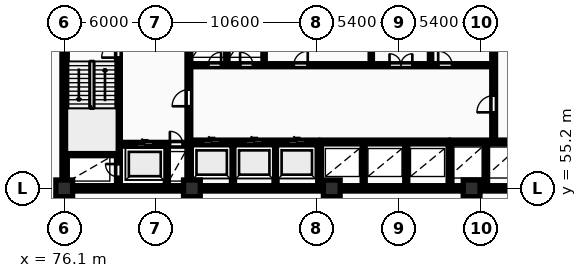
"""IFC4 building model, lengths in metres.
Left out: names, types, materials, properties, quantities, classifications, styles, units other than length and angle.
Written with IfcOpenShell. Run it as: python <this file> out.ifc"""

import sys

from ifc_helpers import new_model, si_unit, direction, frame, frame_2d, origin, origin_2d, place, context, subcontext, project, spatial, rectangle, extrude, element, fill, save


model = new_model("IFC4")
c1 = context("Model", 3, precision=1e-05, world=origin(), true_north=direction((0.0, 1.0)))
c2 = subcontext(c1, "Body", "Model", "MODEL_VIEW")
j1 = project(units=[si_unit("LENGTHUNIT", "METRE"), si_unit("PLANEANGLEUNIT", "RADIAN")], contexts=[c1])
p1 = place(None, origin())
s1 = spatial("IfcSite", under=j1, at=p1, CompositionType="ELEMENT")
p2 = place(p1, origin())
s2 = spatial("IfcBuilding", under=s1, at=p2, CompositionType="ELEMENT")
p3 = place(p2, frame((0.0, 0.0, 14.5)))
s3 = spatial("IfcBuildingStorey", under=s2, at=p3, CompositionType="ELEMENT", Elevation=14.5)
for number, where, z_axis, x_axis in (
    (1, (76.1, 55.2, 0.0), (0.0, 0.0, 1.0), (1.0, 0.0, 0.0)),
    (2, (84.5, 55.2, 0.0), (0.0, 0.0, 1.0), (1.0, 0.0, 0.0)),
    (3, (93.7, 55.2, 0.0), (0.0, 0.0, 1.0), (1.0, 0.0, 0.0)),
    (4, (102.9, 55.2, 0.0), (0.0, 0.0, 1.0), (1.0, 0.0, 0.0)),
):
    element("IfcColumn", number, at=place(p3, frame(where, z_axis=z_axis, x_axis=x_axis)), inside=s3, PredefinedType="COLUMN", context=c2, shape_type="SweptSolid", body=[
        extrude(rectangle(XDim=1.1, YDim=1.1, at=origin_2d()), origin(), (0.0, 0.0, 1.0), 4.5),
    ])
p4 = place(p3, frame((75.95, 55.2, 0.0), z_axis=(0.0, 0.0, 1.0), x_axis=(1.0, 0.0, 0.0)))
e5 = element("IfcWall", 5, at=p4, inside=s3, PredefinedType="SHEAR", context=c2, shape_type="SweptSolid", body=[
    extrude(rectangle(XDim=36.3, YDim=0.35, at=frame_2d((18.15, 0.0))), origin(), (0.0, 0.0, 1.0), 4.5),
])
p5 = place(p3, frame((76.125, 55.375, 0.0), z_axis=(0.0, 0.0, 1.0), x_axis=(0.0, 1.0, 0.0)))
e6 = element("IfcWall", 6, at=p5, inside=s3, PredefinedType="SHEAR", context=c2, shape_type="SweptSolid", body=[
    extrude(rectangle(XDim=11.65, YDim=0.35, at=frame_2d((5.825, 0.0))), origin(), (0.0, 0.0, 1.0), 4.5),
])
p6 = place(p3, frame((79.665, 55.4, 0.0), z_axis=(0.0, 0.0, 1.0), x_axis=(0.0, 1.0, 0.0)))
e7 = element("IfcWall", 7, at=p6, inside=s3, PredefinedType="SHEAR", context=c2, shape_type="SweptSolid", body=[
    extrude(rectangle(XDim=11.6, YDim=0.25, at=frame_2d((5.8, 0.0))), origin(), (0.0, 0.0, 1.0), 4.5),
])
p7 = place(p6, frame((0.55, 0.0, 0.0)))
e8 = element("IfcOpeningElement", 8, at=p7, cuts=e7, PredefinedType="OPENING", context=c2, shape_type="SweptSolid", body=[
    extrude(rectangle(XDim=0.85, YDim=2.05, at=frame_2d((0.425, 1.025))), frame((0.0, 0.135, 0.0), z_axis=(0.0, -1.0, 0.0), x_axis=(1.0, 0.0, 0.0)), (0.0, 0.0, 1.0), 0.27),
])
p8 = place(p6, frame((8.4, 0.0, 0.0)))
e9 = element("IfcOpeningElement", 9, at=p8, cuts=e7, PredefinedType="OPENING", context=c2, shape_type="SweptSolid", body=[
    extrude(rectangle(XDim=1.1, YDim=2.1, at=frame_2d((0.55, 1.05))), frame((0.0, 0.135, 0.0), z_axis=(0.0, -1.0, 0.0), x_axis=(1.0, 0.0, 0.0)), (0.0, 0.0, 1.0), 0.27),
])
p9 = place(p6, frame((10.25, 0.0, 0.0)))
e10 = element("IfcOpeningElement", 10, at=p9, cuts=e7, PredefinedType="OPENING", context=c2, shape_type="SweptSolid", body=[
    extrude(rectangle(XDim=0.85, YDim=2.05, at=frame_2d((0.425, 1.025))), frame((0.0, 0.135, 0.0), z_axis=(0.0, -1.0, 0.0), x_axis=(1.0, 0.0, 0.0)), (0.0, 0.0, 1.0), 0.27),
])
p10 = place(p3, frame((76.3, 57.475, 0.0), z_axis=(0.0, 0.0, 1.0), x_axis=(1.0, 0.0, 0.0)))
e11 = element("IfcWall", 11, at=p10, inside=s3, PredefinedType="SHEAR", context=c2, shape_type="SweptSolid", body=[
    extrude(rectangle(XDim=3.24, YDim=0.25, at=frame_2d((1.62, 0.0))), origin(), (0.0, 0.0, 1.0), 4.5),
])
p11 = place(p3, frame((79.79, 58.1, 0.0), z_axis=(0.0, 0.0, 1.0), x_axis=(1.0, 0.0, 0.0)))
e12 = element("IfcWall", 12, at=p11, inside=s3, PredefinedType="SHEAR", context=c2, shape_type="SweptSolid", body=[
    extrude(rectangle(XDim=4.39, YDim=0.25, at=frame_2d((2.195, 0.0))), origin(), (0.0, 0.0, 1.0), 4.5),
])
p12 = place(p11, frame((1.05, 0.0, 0.0)))
e13 = element("IfcOpeningElement", 13, at=p12, cuts=e12, PredefinedType="OPENING", context=c2, shape_type="SweptSolid", body=[
    extrude(rectangle(XDim=1.12, YDim=2.12, at=frame_2d((0.56, 1.06))), frame((0.0, 0.135, 0.0), z_axis=(0.0, -1.0, 0.0), x_axis=(1.0, 0.0, 0.0)), (0.0, 0.0, 1.0), 0.27),
])
p13 = place(p11, frame((3.26, 0.0, 0.0)))
e14 = element("IfcOpeningElement", 14, at=p13, cuts=e12, PredefinedType="OPENING", context=c2, shape_type="SweptSolid", body=[
    extrude(rectangle(XDim=0.85, YDim=2.05, at=frame_2d((0.425, 1.025))), frame((0.0, 0.135, 0.0), z_axis=(0.0, -1.0, 0.0), x_axis=(1.0, 0.0, 0.0)), (0.0, 0.0, 1.0), 0.27),
])
p14 = place(p3, frame((82.85, 55.4, 0.0), z_axis=(0.0, 0.0, 1.0), x_axis=(0.0, 1.0, 0.0)))
e15 = element("IfcWall", 15, at=p14, inside=s3, PredefinedType="PARTITIONING", context=c2, shape_type="SweptSolid", body=[
    extrude(rectangle(XDim=2.56, YDim=0.2, at=frame_2d((1.28, 0.0))), origin(), (0.0, 0.0, 1.0), 4.18),
])
p15 = place(p3, frame((84.3, 55.4, 0.0), z_axis=(0.0, 0.0, 1.0), x_axis=(0.0, 1.0, 0.0)))
e16 = element("IfcWall", 16, at=p15, inside=s3, PredefinedType="SHEAR", context=c2, shape_type="SweptSolid", body=[
    extrude(rectangle(XDim=11.6, YDim=0.25, at=frame_2d((5.8, 0.0))), origin(), (0.0, 0.0, 1.0), 4.5),
])
p16 = place(p15, frame((5.2, 0.0, 0.0)))
e17 = element("IfcOpeningElement", 17, at=p16, cuts=e16, PredefinedType="OPENING", context=c2, shape_type="SweptSolid", body=[
    extrude(rectangle(XDim=1.1, YDim=2.1, at=frame_2d((0.55, 1.05))), frame((0.0, 0.135, 0.0), z_axis=(0.0, -1.0, 0.0), x_axis=(1.0, 0.0, 0.0)), (0.0, 0.0, 1.0), 0.27),
])
for number, where, z_axis, x_axis in (
    (18, (87.2, 55.4, 0.0), (0.0, 0.0, 1.0), (0.0, 1.0, 0.0)),
    (19, (90.0, 55.4, 0.0), (0.0, 0.0, 1.0), (0.0, 1.0, 0.0)),
):
    element("IfcWall", number, at=place(p3, frame(where, z_axis=z_axis, x_axis=x_axis)), inside=s3, PredefinedType="PARTITIONING", context=c2, shape_type="SweptSolid", body=[
        extrude(rectangle(XDim=2.72, YDim=0.2, at=frame_2d((1.36, 0.0))), origin(), (0.0, 0.0, 1.0), 4.18),
    ])
p17 = place(p3, frame((84.42, 58.25, 0.0), z_axis=(0.0, 0.0, 1.0), x_axis=(1.0, 0.0, 0.0)))
e20 = element("IfcWall", 20, at=p17, inside=s3, PredefinedType="SHEAR", context=c2, shape_type="SweptSolid", body=[
    extrude(rectangle(XDim=8.36, YDim=0.25, at=frame_2d((4.18, 0.0))), origin(), (0.0, 0.0, 1.0), 4.5),
])
p18 = place(p17, frame((0.82, 0.0, 0.0)))
e21 = element("IfcOpeningElement", 21, at=p18, cuts=e20, PredefinedType="OPENING", context=c2, shape_type="SweptSolid", body=[
    extrude(rectangle(XDim=1.12, YDim=2.12, at=frame_2d((0.56, 1.06))), frame((0.0, 0.135, 0.0), z_axis=(0.0, -1.0, 0.0), x_axis=(1.0, 0.0, 0.0)), (0.0, 0.0, 1.0), 0.27),
])
p19 = place(p17, frame((3.62, 0.0, 0.0)))
e22 = element("IfcOpeningElement", 22, at=p19, cuts=e20, PredefinedType="OPENING", context=c2, shape_type="SweptSolid", body=[
    extrude(rectangle(XDim=1.12, YDim=2.12, at=frame_2d((0.56, 1.06))), frame((0.0, 0.135, 0.0), z_axis=(0.0, -1.0, 0.0), x_axis=(1.0, 0.0, 0.0)), (0.0, 0.0, 1.0), 0.27),
])
p20 = place(p17, frame((6.42, 0.0, 0.0)))
e23 = element("IfcOpeningElement", 23, at=p20, cuts=e20, PredefinedType="OPENING", context=c2, shape_type="SweptSolid", body=[
    extrude(rectangle(XDim=1.12, YDim=2.12, at=frame_2d((0.56, 1.06))), frame((0.0, 0.135, 0.0), z_axis=(0.0, -1.0, 0.0), x_axis=(1.0, 0.0, 0.0)), (0.0, 0.0, 1.0), 0.27),
])
p21 = place(p3, frame((92.9, 55.4, 0.0), z_axis=(0.0, 0.0, 1.0), x_axis=(0.0, 1.0, 0.0)))
e24 = element("IfcWall", 24, at=p21, inside=s3, PredefinedType="SHEAR", context=c2, shape_type="SweptSolid", body=[
    extrude(rectangle(XDim=2.85, YDim=0.25, at=frame_2d((1.425, 0.0))), origin(), (0.0, 0.0, 1.0), 4.5),
])
for number, where, z_axis, x_axis in (
    (25, (95.8, 55.4, 0.0), (0.0, 0.0, 1.0), (0.0, 1.0, 0.0)),
    (26, (98.6, 55.4, 0.0), (0.0, 0.0, 1.0), (0.0, 1.0, 0.0)),
):
    element("IfcWall", number, at=place(p3, frame(where, z_axis=z_axis, x_axis=x_axis)), inside=s3, PredefinedType="PARTITIONING", context=c2, shape_type="SweptSolid", body=[
        extrude(rectangle(XDim=2.72, YDim=0.2, at=frame_2d((1.36, 0.0))), origin(), (0.0, 0.0, 1.0), 4.18),
    ])
p22 = place(p3, frame((93.02, 58.25, 0.0), z_axis=(0.0, 0.0, 1.0), x_axis=(1.0, 0.0, 0.0)))
e27 = element("IfcWall", 27, at=p22, inside=s3, PredefinedType="SHEAR", context=c2, shape_type="SweptSolid", body=[
    extrude(rectangle(XDim=8.36, YDim=0.25, at=frame_2d((4.18, 0.0))), origin(), (0.0, 0.0, 1.0), 4.5),
])
p23 = place(p3, frame((101.48, 55.4, 0.0), z_axis=(0.0, 0.0, 1.0), x_axis=(0.0, 1.0, 0.0)))
e28 = element("IfcWall", 28, at=p23, inside=s3, PredefinedType="SHEAR", context=c2, shape_type="SweptSolid", body=[
    extrude(rectangle(XDim=2.85, YDim=0.25, at=frame_2d((1.425, 0.0))), origin(), (0.0, 0.0, 1.0), 4.5),
])
p24 = place(p3, frame((103.85, 55.4, 0.0), z_axis=(0.0, 0.0, 1.0), x_axis=(0.0, 1.0, 0.0)))
e29 = element("IfcWall", 29, at=p24, inside=s3, PredefinedType="PARTITIONING", context=c2, shape_type="SweptSolid", body=[
    extrude(rectangle(XDim=2.72, YDim=0.2, at=frame_2d((1.36, 0.0))), origin(), (0.0, 0.0, 1.0), 4.18),
])
p25 = place(p3, frame((101.55, 58.25, 0.0), z_axis=(0.0, 0.0, 1.0), x_axis=(1.0, 0.0, 0.0)))
e30 = element("IfcWall", 30, at=p25, inside=s3, PredefinedType="SHEAR", context=c2, shape_type="SweptSolid", body=[
    extrude(rectangle(XDim=4.6, YDim=0.25, at=frame_2d((2.3, 0.0))), origin(), (0.0, 0.0, 1.0), 4.5),
])
for number, where, z_axis, x_axis in (
    (31, (86.8, 63.4, 0.0), (0.0, 0.0, 1.0), (0.0, 1.0, 0.0)),
    (32, (89.25, 63.4, 0.0), (0.0, 0.0, 1.0), (0.0, 1.0, 0.0)),
    (33, (96.3, 63.4, 0.0), (0.0, 0.0, 1.0), (0.0, 1.0, 0.0)),
    (34, (100.2, 63.4, 0.0), (0.0, 0.0, 1.0), (0.0, 1.0, 0.0)),
):
    element("IfcWall", number, at=place(p3, frame(where, z_axis=z_axis, x_axis=x_axis)), inside=s3, PredefinedType="PARTITIONING", context=c2, shape_type="SweptSolid", body=[
        extrude(rectangle(XDim=3.6, YDim=0.15, at=frame_2d((1.8, 0.0))), origin(), (0.0, 0.0, 1.0), 4.18),
    ])
p26 = place(p3, frame((84.42, 63.3, 0.0), z_axis=(0.0, 0.0, 1.0), x_axis=(1.0, 0.0, 0.0)))
e35 = element("IfcWall", 35, at=p26, inside=s3, PredefinedType="PARTITIONING", context=c2, shape_type="SweptSolid", body=[
    extrude(rectangle(XDim=19.83, YDim=0.2, at=frame_2d((9.915, 0.0))), origin(), (0.0, 0.0, 1.0), 4.18),
])
p27 = place(p26, frame((1.15, 0.0, 0.0)))
e36 = element("IfcOpeningElement", 36, at=p27, cuts=e35, PredefinedType="OPENING", context=c2, shape_type="SweptSolid", body=[
    extrude(rectangle(XDim=0.85, YDim=2.05, at=frame_2d((0.425, 1.025))), frame((0.0, 0.11, 0.0), z_axis=(0.0, -1.0, 0.0), x_axis=(1.0, 0.0, 0.0)), (0.0, 0.0, 1.0), 0.22),
])
p28 = place(p26, frame((3.25, 0.0, 0.0)))
e37 = element("IfcOpeningElement", 37, at=p28, cuts=e35, PredefinedType="OPENING", context=c2, shape_type="SweptSolid", body=[
    extrude(rectangle(XDim=0.85, YDim=2.05, at=frame_2d((0.425, 1.025))), frame((0.0, 0.11, 0.0), z_axis=(0.0, -1.0, 0.0), x_axis=(1.0, 0.0, 0.0)), (0.0, 0.0, 1.0), 0.22),
])
p29 = place(p26, frame((13.08, 0.0, 0.0)))
e38 = element("IfcOpeningElement", 38, at=p29, cuts=e35, PredefinedType="OPENING", context=c2, shape_type="SweptSolid", body=[
    extrude(rectangle(XDim=1.5, YDim=2.2, at=frame_2d((0.75, 1.1))), frame((0.0, 0.11, 0.0), z_axis=(0.0, -1.0, 0.0), x_axis=(1.0, 0.0, 0.0)), (0.0, 0.0, 1.0), 0.22),
])
p30 = place(p26, frame((6.78, 0.0, 0.0)))
e39 = element("IfcOpeningElement", 39, at=p30, cuts=e35, PredefinedType="OPENING", context=c2, shape_type="SweptSolid", body=[
    extrude(rectangle(XDim=0.92, YDim=2.08, at=frame_2d((0.46, 1.04))), frame((0.0, 0.11, 0.0), z_axis=(0.0, -1.0, 0.0), x_axis=(1.0, 0.0, 0.0)), (0.0, 0.0, 1.0), 0.22),
])
p31 = place(p26, frame((16.28, 0.0, 0.0)))
e40 = element("IfcOpeningElement", 40, at=p31, cuts=e35, PredefinedType="OPENING", context=c2, shape_type="SweptSolid", body=[
    extrude(rectangle(XDim=0.92, YDim=2.08, at=frame_2d((0.46, 1.04))), frame((0.0, 0.11, 0.0), z_axis=(0.0, -1.0, 0.0), x_axis=(1.0, 0.0, 0.0)), (0.0, 0.0, 1.0), 0.22),
])
p32 = place(p3, frame((104.35, 58.4, 0.0), z_axis=(0.0, 0.0, 1.0), x_axis=(0.0, 1.0, 0.0)))
e41 = element("IfcWall", 41, at=p32, inside=s3, PredefinedType="SHEAR", context=c2, shape_type="SweptSolid", body=[
    extrude(rectangle(XDim=8.6, YDim=0.25, at=frame_2d((4.3, 0.0))), origin(), (0.0, 0.0, 1.0), 4.5),
])
p33 = place(p32, frame((1.8, 0.0, 0.0)))
e42 = element("IfcOpeningElement", 42, at=p33, cuts=e41, PredefinedType="OPENING", context=c2, shape_type="SweptSolid", body=[
    extrude(rectangle(XDim=1.1, YDim=2.1, at=frame_2d((0.55, 1.05))), frame((0.0, 0.135, 0.0), z_axis=(0.0, -1.0, 0.0), x_axis=(1.0, 0.0, 0.0)), (0.0, 0.0, 1.0), 0.27),
])
p34 = place(p7, origin())
e43 = element("IfcDoor", 43, at=p34, inside=s3, OperationType="SINGLE_SWING_RIGHT", PredefinedType="DOOR", context=c2, shape_type="SweptSolid", body=[
    extrude(rectangle(XDim=0.85, YDim=2.05, at=frame_2d((0.425, 1.025))), frame((0.0, 0.025, 0.0), z_axis=(0.0, -1.0, 0.0), x_axis=(1.0, 0.0, 0.0)), (0.0, 0.0, 1.0), 0.05),
])
fill(e8, e43)
p35 = place(p8, origin())
e44 = element("IfcDoor", 44, at=p35, inside=s3, OperationType="SINGLE_SWING_LEFT", PredefinedType="DOOR", context=c2, shape_type="SweptSolid", body=[
    extrude(rectangle(XDim=1.1, YDim=2.1, at=frame_2d((0.55, 1.05))), frame((0.0, 0.025, 0.0), z_axis=(0.0, -1.0, 0.0), x_axis=(1.0, 0.0, 0.0)), (0.0, 0.0, 1.0), 0.05),
])
fill(e9, e44)
p36 = place(p12, origin())
e45 = element("IfcDoor", 45, at=p36, inside=s3, OperationType="SLIDING_TO_LEFT", PredefinedType="DOOR", context=c2, shape_type="SweptSolid", body=[
    extrude(rectangle(XDim=1.12, YDim=2.12, at=frame_2d((0.56, 1.06))), frame((0.0, 0.025, 0.0), z_axis=(0.0, -1.0, 0.0), x_axis=(1.0, 0.0, 0.0)), (0.0, 0.0, 1.0), 0.05),
])
fill(e13, e45)
p37 = place(p13, origin())
e46 = element("IfcDoor", 46, at=p37, inside=s3, OperationType="SINGLE_SWING_LEFT", PredefinedType="DOOR", context=c2, shape_type="SweptSolid", body=[
    extrude(rectangle(XDim=0.85, YDim=2.05, at=frame_2d((0.425, 1.025))), frame((0.0, 0.025, 0.0), z_axis=(0.0, -1.0, 0.0), x_axis=(1.0, 0.0, 0.0)), (0.0, 0.0, 1.0), 0.05),
])
fill(e14, e46)
p38 = place(p16, origin())
e47 = element("IfcDoor", 47, at=p38, inside=s3, OperationType="SINGLE_SWING_LEFT", PredefinedType="DOOR", context=c2, shape_type="SweptSolid", body=[
    extrude(rectangle(XDim=1.1, YDim=2.1, at=frame_2d((0.55, 1.05))), frame((0.0, 0.025, 0.0), z_axis=(0.0, -1.0, 0.0), x_axis=(1.0, 0.0, 0.0)), (0.0, 0.0, 1.0), 0.05),
])
fill(e17, e47)
p39 = place(p18, origin())
e48 = element("IfcDoor", 48, at=p39, inside=s3, OperationType="SLIDING_TO_LEFT", PredefinedType="DOOR", context=c2, shape_type="SweptSolid", body=[
    extrude(rectangle(XDim=1.12, YDim=2.12, at=frame_2d((0.56, 1.06))), frame((0.0, 0.025, 0.0), z_axis=(0.0, -1.0, 0.0), x_axis=(1.0, 0.0, 0.0)), (0.0, 0.0, 1.0), 0.05),
])
fill(e21, e48)
p40 = place(p19, origin())
e49 = element("IfcDoor", 49, at=p40, inside=s3, OperationType="SLIDING_TO_LEFT", PredefinedType="DOOR", context=c2, shape_type="SweptSolid", body=[
    extrude(rectangle(XDim=1.12, YDim=2.12, at=frame_2d((0.56, 1.06))), frame((0.0, 0.025, 0.0), z_axis=(0.0, -1.0, 0.0), x_axis=(1.0, 0.0, 0.0)), (0.0, 0.0, 1.0), 0.05),
])
fill(e22, e49)
p41 = place(p20, origin())
e50 = element("IfcDoor", 50, at=p41, inside=s3, OperationType="SLIDING_TO_LEFT", PredefinedType="DOOR", context=c2, shape_type="SweptSolid", body=[
    extrude(rectangle(XDim=1.12, YDim=2.12, at=frame_2d((0.56, 1.06))), frame((0.0, 0.025, 0.0), z_axis=(0.0, -1.0, 0.0), x_axis=(1.0, 0.0, 0.0)), (0.0, 0.0, 1.0), 0.05),
])
fill(e23, e50)
p42 = place(p27, origin())
e51 = element("IfcDoor", 51, at=p42, inside=s3, OperationType="SINGLE_SWING_RIGHT", PredefinedType="DOOR", context=c2, shape_type="SweptSolid", body=[
    extrude(rectangle(XDim=0.85, YDim=2.05, at=frame_2d((0.425, 1.025))), frame((0.0, 0.025, 0.0), z_axis=(0.0, -1.0, 0.0), x_axis=(1.0, 0.0, 0.0)), (0.0, 0.0, 1.0), 0.05),
])
fill(e36, e51)
p43 = place(p28, origin())
e52 = element("IfcDoor", 52, at=p43, inside=s3, OperationType="SINGLE_SWING_LEFT", PredefinedType="DOOR", context=c2, shape_type="SweptSolid", body=[
    extrude(rectangle(XDim=0.85, YDim=2.05, at=frame_2d((0.425, 1.025))), frame((0.0, 0.025, 0.0), z_axis=(0.0, -1.0, 0.0), x_axis=(1.0, 0.0, 0.0)), (0.0, 0.0, 1.0), 0.05),
])
fill(e37, e52)
p44 = place(p29, origin())
e53 = element("IfcDoor", 53, at=p44, inside=s3, OperationType="DOUBLE_DOOR_SINGLE_SWING", PredefinedType="DOOR", context=c2, shape_type="SweptSolid", body=[
    extrude(rectangle(XDim=1.5, YDim=2.2, at=frame_2d((0.75, 1.1))), frame((0.0, 0.025, 0.0), z_axis=(0.0, -1.0, 0.0), x_axis=(1.0, 0.0, 0.0)), (0.0, 0.0, 1.0), 0.05),
])
fill(e38, e53)
p45 = place(p30, origin())
e54 = element("IfcDoor", 54, at=p45, inside=s3, OperationType="SINGLE_SWING_RIGHT", PredefinedType="DOOR", context=c2, shape_type="SweptSolid", body=[
    extrude(rectangle(XDim=0.92, YDim=2.08, at=frame_2d((0.46, 1.04))), frame((0.0, 0.025, 0.0), z_axis=(0.0, -1.0, 0.0), x_axis=(1.0, 0.0, 0.0)), (0.0, 0.0, 1.0), 0.05),
])
fill(e39, e54)
p46 = place(p31, origin())
e55 = element("IfcDoor", 55, at=p46, inside=s3, OperationType="SINGLE_SWING_LEFT", PredefinedType="DOOR", context=c2, shape_type="SweptSolid", body=[
    extrude(rectangle(XDim=0.92, YDim=2.08, at=frame_2d((0.46, 1.04))), frame((0.0, 0.025, 0.0), z_axis=(0.0, -1.0, 0.0), x_axis=(1.0, 0.0, 0.0)), (0.0, 0.0, 1.0), 0.05),
])
fill(e40, e55)
p47 = place(p33, origin())
e56 = element("IfcDoor", 56, at=p47, inside=s3, OperationType="SINGLE_SWING_LEFT", PredefinedType="DOOR", context=c2, shape_type="SweptSolid", body=[
    extrude(rectangle(XDim=1.1, YDim=2.1, at=frame_2d((0.55, 1.05))), frame((0.0, 0.025, 0.0), z_axis=(0.0, -1.0, 0.0), x_axis=(1.0, 0.0, 0.0)), (0.0, 0.0, 1.0), 0.05),
])
fill(e42, e56)
save(model, sys.argv[1])
